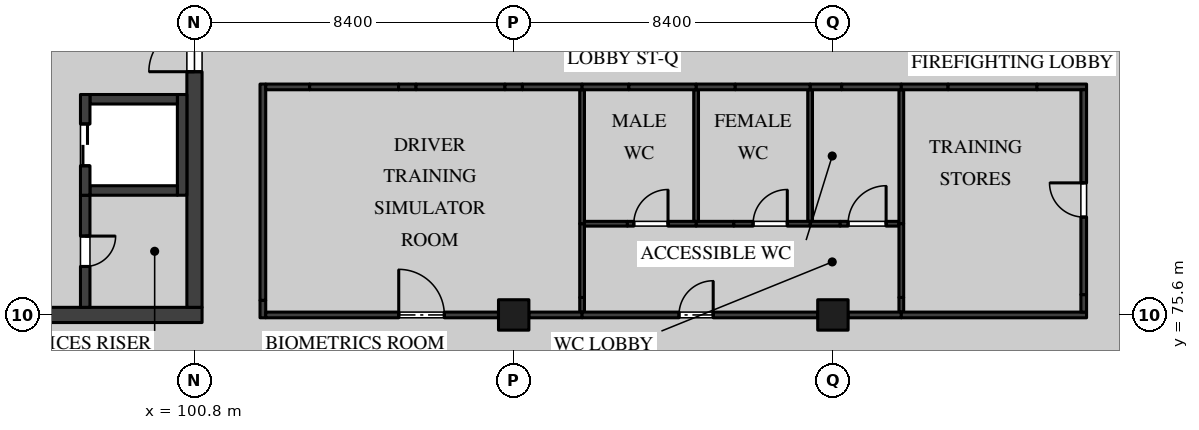
"""IFC4 building model, lengths in metres.
Left out: names, types, materials, properties, quantities, classifications, styles, units other than length and angle.
Written with IfcOpenShell. Run it as: python <this file> out.ifc"""

import sys

from ifc_helpers import new_model, si_unit, direction, frame, frame_2d, origin, origin_2d, place, context, subcontext, project, spatial, rectangle, extrude, element, fill, save


model = new_model("IFC4")
c1 = context("Model", 3, precision=1e-05, world=origin(), true_north=direction((0.0, 1.0)))
c2 = subcontext(c1, "Body", "Model", "MODEL_VIEW")
j1 = project(units=[si_unit("LENGTHUNIT", "METRE"), si_unit("PLANEANGLEUNIT", "RADIAN")], contexts=[c1])
p1 = place(None, origin())
s1 = spatial("IfcSite", under=j1, at=p1, CompositionType="ELEMENT")
p2 = place(p1, origin())
s2 = spatial("IfcBuilding", under=s1, at=p2, CompositionType="ELEMENT")
p3 = place(p2, frame((0.0, 0.0, 5.4)))
s3 = spatial("IfcBuildingStorey", under=s2, at=p3, CompositionType="ELEMENT", Elevation=5.4)
for number, where, z_axis, x_axis in (
    (1, (109.2, 75.6, 0.0), (0.0, 0.0, 1.0), (1.0, 0.0, 0.0)),
    (2, (117.6, 75.6, 0.0), (0.0, 0.0, 1.0), (1.0, 0.0, 0.0)),
):
    element("IfcColumn", number, at=place(p3, frame(where, z_axis=z_axis, x_axis=x_axis)), inside=s3, PredefinedType="COLUMN", context=c2, shape_type="SweptSolid", body=[
        extrude(rectangle(XDim=0.8, YDim=0.8, at=origin_2d()), origin(), (0.0, 0.0, 1.0), 4.37),
    ])
p4 = place(p3, frame((92.2, 75.6, 0.0), z_axis=(0.0, 0.0, 1.0), x_axis=(1.0, 0.0, 0.0)))
e3 = element("IfcWall", 3, at=p4, inside=s3, PredefinedType="SHEAR", context=c2, shape_type="SweptSolid", body=[
    extrude(rectangle(XDim=8.8, YDim=0.4, at=frame_2d((4.4, 0.0))), origin(), (0.0, 0.0, 1.0), 4.37),
])
p5 = place(p3, frame((100.8, 75.8, 0.0), z_axis=(0.0, 0.0, 1.0), x_axis=(0.0, 1.0, 0.0)))
e4 = element("IfcWall", 4, at=p5, inside=s3, PredefinedType="SHEAR", context=c2, shape_type="SweptSolid", body=[
    extrude(rectangle(XDim=8.0, YDim=0.4, at=frame_2d((4.0, 0.0))), origin(), (0.0, 0.0, 1.0), 4.37),
])
p6 = place(p5, frame((6.2, 0.0, 0.0)))
e5 = element("IfcOpeningElement", 5, at=p6, cuts=e4, PredefinedType="OPENING", context=c2, shape_type="SweptSolid", body=[
    extrude(rectangle(XDim=1.2, YDim=2.1, at=frame_2d((0.6, 1.05))), frame((0.0, 0.21, 0.0), z_axis=(0.0, -1.0, 0.0), x_axis=(1.0, 0.0, 0.0)), (0.0, 0.0, 1.0), 0.42),
])
p7 = place(p3, frame((97.925, 78.75, 0.0), z_axis=(0.0, 0.0, 1.0), x_axis=(0.0, -1.0, 0.0)))
e6 = element("IfcWall", 6, at=p7, inside=s3, PredefinedType="SOLIDWALL", context=c2, shape_type="SweptSolid", body=[
    extrude(rectangle(XDim=2.95, YDim=0.25, at=frame_2d((1.475, 0.0))), origin(), (0.0, 0.0, 1.0), 4.37),
])
p8 = place(p7, frame((1.075, 0.0, 0.0)))
e7 = element("IfcOpeningElement", 7, at=p8, cuts=e6, PredefinedType="OPENING", context=c2, shape_type="SweptSolid", body=[
    extrude(rectangle(XDim=0.8, YDim=2.1, at=frame_2d((0.4, 1.05))), frame((0.0, 0.135, 0.0), z_axis=(0.0, -1.0, 0.0), x_axis=(1.0, 0.0, 0.0)), (0.0, 0.0, 1.0), 0.27),
])
p9 = place(p3, frame((100.475, 78.75, 0.0), z_axis=(0.0, 0.0, 1.0), x_axis=(0.0, 1.0, 0.0)))
e8 = element("IfcWall", 8, at=p9, inside=s3, PredefinedType="SOLIDWALL", context=c2, shape_type="SweptSolid", body=[
    extrude(rectangle(XDim=2.65, YDim=0.25, at=frame_2d((1.325, 0.0))), origin(), (0.0, 0.0, 1.0), 4.37),
])
for number, where, z_axis, x_axis in (
    (9, (98.05, 81.275, 0.0), (0.0, 0.0, 1.0), (1.0, 0.0, 0.0)),
    (10, (98.05, 78.875, 0.0), (0.0, 0.0, 1.0), (1.0, 0.0, 0.0)),
):
    element("IfcWall", number, at=place(p3, frame(where, z_axis=z_axis, x_axis=x_axis)), inside=s3, PredefinedType="SOLIDWALL", context=c2, shape_type="SweptSolid", body=[
        extrude(rectangle(XDim=2.3, YDim=0.25, at=frame_2d((1.15, 0.0))), origin(), (0.0, 0.0, 1.0), 4.37),
    ])
p10 = place(p3, frame((97.925, 78.75, 0.0), z_axis=(0.0, 0.0, 1.0), x_axis=(0.0, 1.0, 0.0)))
e11 = element("IfcWall", 11, at=p10, inside=s3, PredefinedType="SOLIDWALL", context=c2, shape_type="SweptSolid", body=[
    extrude(rectangle(XDim=2.65, YDim=0.25, at=frame_2d((1.325, 0.0))), origin(), (0.0, 0.0, 1.0), 4.37),
])
p11 = place(p10, frame((0.775, 0.0, 0.0)))
e12 = element("IfcOpeningElement", 12, at=p11, cuts=e11, PredefinedType="OPENING", context=c2, shape_type="SweptSolid", body=[
    extrude(rectangle(XDim=1.1, YDim=2.1, at=frame_2d((0.55, 1.05))), frame((0.0, 0.135, 0.0), z_axis=(0.0, -1.0, 0.0), x_axis=(1.0, 0.0, 0.0)), (0.0, 0.0, 1.0), 0.27),
])
p12 = place(p3, frame((111.0, 75.675, 0.0), z_axis=(0.0, 0.0, 1.0), x_axis=(0.0, 1.0, 0.0)))
e13 = element("IfcWall", 13, at=p12, inside=s3, PredefinedType="PARTITIONING", context=c2, shape_type="SweptSolid", body=[
    extrude(rectangle(XDim=0.385, YDim=0.125, at=frame_2d((0.192, 0.0))), origin(), (0.0, 0.0, 1.0), 3.746),
])
p13 = place(p3, frame((111.0, 76.06, 0.0), z_axis=(0.0, 0.0, 1.0), x_axis=(0.0, 1.0, 0.0)))
e14 = element("IfcWall", 14, at=p13, inside=s3, PredefinedType="PARTITIONING", context=c2, shape_type="SweptSolid", body=[
    extrude(rectangle(XDim=1.94, YDim=0.125, at=frame_2d((0.97, 0.0))), origin(), (0.0, 0.0, 1.0), 4.37),
])
p14 = place(p3, frame((111.0, 78.0, 0.0), z_axis=(0.0, 0.0, 1.0), x_axis=(0.0, 1.0, 0.0)))
e15 = element("IfcWall", 15, at=p14, inside=s3, PredefinedType="PARTITIONING", context=c2, shape_type="SweptSolid", body=[
    extrude(rectangle(XDim=3.525, YDim=0.125, at=frame_2d((1.762, 0.0))), origin(), (0.0, 0.0, 1.0), 4.37),
])
p15 = place(p3, frame((102.6, 75.525, 0.0), z_axis=(0.0, 0.0, 1.0), x_axis=(0.0, 1.0, 0.0)))
e16 = element("IfcWall", 16, at=p15, inside=s3, PredefinedType="PARTITIONING", context=c2, shape_type="SweptSolid", body=[
    extrude(rectangle(XDim=0.46, YDim=0.15, at=frame_2d((0.23, 0.0))), origin(), (0.0, 0.0, 1.0), 3.746),
])
p16 = place(p3, frame((102.6, 75.985, 0.0), z_axis=(0.0, 0.0, 1.0), x_axis=(0.0, 1.0, 0.0)))
e17 = element("IfcWall", 17, at=p16, inside=s3, PredefinedType="PARTITIONING", context=c2, shape_type="SweptSolid", body=[
    extrude(rectangle(XDim=5.69, YDim=0.15, at=frame_2d((2.845, 0.0))), origin(), (0.0, 0.0, 1.0), 4.37),
])
p17 = place(p3, frame((102.675, 75.6, 0.0), z_axis=(0.0, 0.0, 1.0), x_axis=(1.0, 0.0, 0.0)))
e18 = element("IfcWall", 18, at=p17, inside=s3, PredefinedType="PARTITIONING", context=c2, shape_type="SweptSolid", body=[
    extrude(rectangle(XDim=6.125, YDim=0.15, at=frame_2d((3.062, 0.0))), origin(), (0.0, 0.0, 1.0), 3.746),
])
p18 = place(p17, frame((3.5, 0.0, 0.0)))
e19 = element("IfcOpeningElement", 19, at=p18, cuts=e18, PredefinedType="OPENING", context=c2, shape_type="SweptSolid", body=[
    extrude(rectangle(XDim=1.2, YDim=2.4, at=frame_2d((0.6, 1.2))), frame((0.0, 0.085, 0.0), z_axis=(0.0, -1.0, 0.0), x_axis=(1.0, 0.0, 0.0)), (0.0, 0.0, 1.0), 0.17),
])
p19 = place(p3, frame((109.6, 75.6, 0.0), z_axis=(0.0, 0.0, 1.0), x_axis=(1.0, 0.0, 0.0)))
e20 = element("IfcWall", 20, at=p19, inside=s3, PredefinedType="PARTITIONING", context=c2, shape_type="SweptSolid", body=[
    extrude(rectangle(XDim=1.4, YDim=0.15, at=frame_2d((0.7, 0.0))), origin(), (0.0, 0.0, 1.0), 3.746),
])
p20 = place(p3, frame((102.675, 81.6, 0.0), z_axis=(0.0, 0.0, 1.0), x_axis=(1.0, 0.0, 0.0)))
e21 = element("IfcWall", 21, at=p20, inside=s3, PredefinedType="PARTITIONING", context=c2, shape_type="SweptSolid", body=[
    extrude(rectangle(XDim=1.155, YDim=0.15, at=frame_2d((0.578, 0.0))), origin(), (0.0, 0.0, 1.0), 3.895),
])
p21 = place(p3, frame((103.83, 81.6, 0.0), z_axis=(0.0, 0.0, 1.0), x_axis=(1.0, 0.0, 0.0)))
e22 = element("IfcWall", 22, at=p21, inside=s3, PredefinedType="PARTITIONING", context=c2, shape_type="SweptSolid", body=[
    extrude(rectangle(XDim=2.34, YDim=0.15, at=frame_2d((1.17, 0.0))), origin(), (0.0, 0.0, 1.0), 4.37),
])
p22 = place(p3, frame((106.17, 81.6, 0.0), z_axis=(0.0, 0.0, 1.0), x_axis=(1.0, 0.0, 0.0)))
e23 = element("IfcWall", 23, at=p22, inside=s3, PredefinedType="PARTITIONING", context=c2, shape_type="SweptSolid", body=[
    extrude(rectangle(XDim=0.46, YDim=0.15, at=frame_2d((0.23, 0.0))), origin(), (0.0, 0.0, 1.0), 3.895),
])
p23 = place(p3, frame((106.63, 81.6, 0.0), z_axis=(0.0, 0.0, 1.0), x_axis=(1.0, 0.0, 0.0)))
e24 = element("IfcWall", 24, at=p23, inside=s3, PredefinedType="PARTITIONING", context=c2, shape_type="SweptSolid", body=[
    extrude(rectangle(XDim=2.34, YDim=0.15, at=frame_2d((1.17, 0.0))), origin(), (0.0, 0.0, 1.0), 4.37),
])
p24 = place(p3, frame((108.97, 81.6, 0.0), z_axis=(0.0, 0.0, 1.0), x_axis=(1.0, 0.0, 0.0)))
e25 = element("IfcWall", 25, at=p24, inside=s3, PredefinedType="PARTITIONING", context=c2, shape_type="SweptSolid", body=[
    extrude(rectangle(XDim=0.46, YDim=0.15, at=frame_2d((0.23, 0.0))), origin(), (0.0, 0.0, 1.0), 3.746),
])
p25 = place(p3, frame((109.43, 81.6, 0.0), z_axis=(0.0, 0.0, 1.0), x_axis=(1.0, 0.0, 0.0)))
e26 = element("IfcWall", 26, at=p25, inside=s3, PredefinedType="PARTITIONING", context=c2, shape_type="SweptSolid", body=[
    extrude(rectangle(XDim=1.57, YDim=0.15, at=frame_2d((0.785, 0.0))), origin(), (0.0, 0.0, 1.0), 4.37),
])
p26 = place(p3, frame((117.0, 78.062, 0.0), z_axis=(0.0, 0.0, 1.0), x_axis=(0.0, 1.0, 0.0)))
e27 = element("IfcWall", 27, at=p26, inside=s3, PredefinedType="PARTITIONING", context=c2, shape_type="SweptSolid", body=[
    extrude(rectangle(XDim=3.463, YDim=0.125, at=frame_2d((1.731, 0.0))), origin(), (0.0, 0.0, 1.0), 4.37),
])
p27 = place(p3, frame((117.0, 78.0, 0.0), z_axis=(0.0, 0.0, 1.0), x_axis=(1.0, 0.0, 0.0)))
e28 = element("IfcWall", 28, at=p27, inside=s3, PredefinedType="PARTITIONING", context=c2, shape_type="SweptSolid", body=[
    extrude(rectangle(XDim=0.792, YDim=0.125, at=frame_2d((0.396, 0.0))), origin(), (0.0, 0.0, 1.0), 3.746),
])
p28 = place(p3, frame((117.792, 78.0, 0.0), z_axis=(0.0, 0.0, 1.0), x_axis=(1.0, 0.0, 0.0)))
e29 = element("IfcWall", 29, at=p28, inside=s3, PredefinedType="PARTITIONING", context=c2, shape_type="SweptSolid", body=[
    extrude(rectangle(XDim=1.546, YDim=0.125, at=frame_2d((0.773, 0.0))), origin(), (0.0, 0.0, 1.0), 4.37),
])
p29 = place(p28, frame((0.208, 0.0, 0.0)))
e30 = element("IfcOpeningElement", 30, at=p29, cuts=e29, PredefinedType="OPENING", context=c2, shape_type="SweptSolid", body=[
    extrude(rectangle(XDim=1.0, YDim=2.1, at=frame_2d((0.5, 1.05))), frame((0.0, 0.073, 0.0), z_axis=(0.0, -1.0, 0.0), x_axis=(1.0, 0.0, 0.0)), (0.0, 0.0, 1.0), 0.145),
])
p30 = place(p3, frame((119.4, 78.0, 0.0), z_axis=(0.0, 0.0, 1.0), x_axis=(0.0, 1.0, 0.0)))
e31 = element("IfcWall", 31, at=p30, inside=s3, PredefinedType="PARTITIONING", context=c2, shape_type="SweptSolid", body=[
    extrude(rectangle(XDim=3.525, YDim=0.125, at=frame_2d((1.762, 0.0))), origin(), (0.0, 0.0, 1.0), 4.37),
])
p31 = place(p3, frame((117.0, 81.6, 0.0), z_axis=(0.0, 0.0, 1.0), x_axis=(1.0, 0.0, 0.0)))
e32 = element("IfcWall", 32, at=p31, inside=s3, PredefinedType="PARTITIONING", context=c2, shape_type="SweptSolid", body=[
    extrude(rectangle(XDim=0.83, YDim=0.15, at=frame_2d((0.415, 0.0))), origin(), (0.0, 0.0, 1.0), 3.746),
])
p32 = place(p3, frame((117.83, 81.6, 0.0), z_axis=(0.0, 0.0, 1.0), x_axis=(1.0, 0.0, 0.0)))
e33 = element("IfcWall", 33, at=p32, inside=s3, PredefinedType="PARTITIONING", context=c2, shape_type="SweptSolid", body=[
    extrude(rectangle(XDim=1.57, YDim=0.15, at=frame_2d((0.785, 0.0))), origin(), (0.0, 0.0, 1.0), 4.37),
])
p33 = place(p3, frame((114.0, 78.0, 0.0), z_axis=(0.0, 0.0, 1.0), x_axis=(1.0, 0.0, 0.0)))
e34 = element("IfcWall", 34, at=p33, inside=s3, PredefinedType="PARTITIONING", context=c2, shape_type="SweptSolid", body=[
    extrude(rectangle(XDim=0.992, YDim=0.125, at=frame_2d((0.496, 0.0))), origin(), (0.0, 0.0, 1.0), 3.895),
])
p34 = place(p3, frame((114.992, 78.0, 0.0), z_axis=(0.0, 0.0, 1.0), x_axis=(1.0, 0.0, 0.0)))
e35 = element("IfcWall", 35, at=p34, inside=s3, PredefinedType="PARTITIONING", context=c2, shape_type="SweptSolid", body=[
    extrude(rectangle(XDim=2.008, YDim=0.125, at=frame_2d((1.004, 0.0))), origin(), (0.0, 0.0, 1.0), 4.37),
])
p35 = place(p34, frame((0.508, 0.0, 0.0)))
e36 = element("IfcOpeningElement", 36, at=p35, cuts=e35, PredefinedType="OPENING", context=c2, shape_type="SweptSolid", body=[
    extrude(rectangle(XDim=0.9, YDim=2.1, at=frame_2d((0.45, 1.05))), frame((0.0, 0.073, 0.0), z_axis=(0.0, -1.0, 0.0), x_axis=(1.0, 0.0, 0.0)), (0.0, 0.0, 1.0), 0.145),
])
p36 = place(p3, frame((114.0, 78.062, 0.0), z_axis=(0.0, 0.0, 1.0), x_axis=(0.0, 1.0, 0.0)))
e37 = element("IfcWall", 37, at=p36, inside=s3, PredefinedType="PARTITIONING", context=c2, shape_type="SweptSolid", body=[
    extrude(rectangle(XDim=3.463, YDim=0.125, at=frame_2d((1.731, 0.0))), origin(), (0.0, 0.0, 1.0), 4.37),
])
p37 = place(p3, frame((114.0, 81.6, 0.0), z_axis=(0.0, 0.0, 1.0), x_axis=(1.0, 0.0, 0.0)))
e38 = element("IfcWall", 38, at=p37, inside=s3, PredefinedType="PARTITIONING", context=c2, shape_type="SweptSolid", body=[
    extrude(rectangle(XDim=1.03, YDim=0.15, at=frame_2d((0.515, 0.0))), origin(), (0.0, 0.0, 1.0), 3.895),
])
p38 = place(p3, frame((115.03, 81.6, 0.0), z_axis=(0.0, 0.0, 1.0), x_axis=(1.0, 0.0, 0.0)))
e39 = element("IfcWall", 39, at=p38, inside=s3, PredefinedType="PARTITIONING", context=c2, shape_type="SweptSolid", body=[
    extrude(rectangle(XDim=1.97, YDim=0.15, at=frame_2d((0.985, 0.0))), origin(), (0.0, 0.0, 1.0), 4.37),
])
p39 = place(p3, frame((111.062, 78.0, 0.0), z_axis=(0.0, 0.0, 1.0), x_axis=(1.0, 0.0, 0.0)))
e40 = element("IfcWall", 40, at=p39, inside=s3, PredefinedType="PARTITIONING", context=c2, shape_type="SweptSolid", body=[
    extrude(rectangle(XDim=1.13, YDim=0.125, at=frame_2d((0.565, 0.0))), origin(), (0.0, 0.0, 1.0), 3.895),
])
p40 = place(p3, frame((112.192, 78.0, 0.0), z_axis=(0.0, 0.0, 1.0), x_axis=(1.0, 0.0, 0.0)))
e41 = element("IfcWall", 41, at=p40, inside=s3, PredefinedType="PARTITIONING", context=c2, shape_type="SweptSolid", body=[
    extrude(rectangle(XDim=1.808, YDim=0.125, at=frame_2d((0.904, 0.0))), origin(), (0.0, 0.0, 1.0), 4.37),
])
p41 = place(p40, frame((0.169, 0.0, 0.0)))
e42 = element("IfcOpeningElement", 42, at=p41, cuts=e41, PredefinedType="OPENING", context=c2, shape_type="SweptSolid", body=[
    extrude(rectangle(XDim=0.9, YDim=2.1, at=frame_2d((0.45, 1.05))), frame((0.0, 0.073, 0.0), z_axis=(0.0, -1.0, 0.0), x_axis=(1.0, 0.0, 0.0)), (0.0, 0.0, 1.0), 0.145),
])
p42 = place(p3, frame((119.4, 75.675, 0.0), z_axis=(0.0, 0.0, 1.0), x_axis=(0.0, 1.0, 0.0)))
e43 = element("IfcWall", 43, at=p42, inside=s3, PredefinedType="PARTITIONING", context=c2, shape_type="SweptSolid", body=[
    extrude(rectangle(XDim=0.385, YDim=0.125, at=frame_2d((0.192, 0.0))), origin(), (0.0, 0.0, 1.0), 3.746),
])
p43 = place(p3, frame((119.4, 76.06, 0.0), z_axis=(0.0, 0.0, 1.0), x_axis=(0.0, 1.0, 0.0)))
e44 = element("IfcWall", 44, at=p43, inside=s3, PredefinedType="PARTITIONING", context=c2, shape_type="SweptSolid", body=[
    extrude(rectangle(XDim=1.94, YDim=0.125, at=frame_2d((0.97, 0.0))), origin(), (0.0, 0.0, 1.0), 4.37),
])
p44 = place(p3, frame((111.0, 75.6, 0.0), z_axis=(0.0, 0.0, 1.0), x_axis=(1.0, 0.0, 0.0)))
e45 = element("IfcWall", 45, at=p44, inside=s3, PredefinedType="PARTITIONING", context=c2, shape_type="SweptSolid", body=[
    extrude(rectangle(XDim=6.2, YDim=0.15, at=frame_2d((3.1, 0.0))), origin(), (0.0, 0.0, 1.0), 3.746),
])
p45 = place(p44, frame((2.55, 0.0, 0.0)))
e46 = element("IfcOpeningElement", 46, at=p45, cuts=e45, PredefinedType="OPENING", context=c2, shape_type="SweptSolid", body=[
    extrude(rectangle(XDim=0.9, YDim=2.1, at=frame_2d((0.45, 1.05))), frame((0.0, 0.085, 0.0), z_axis=(0.0, -1.0, 0.0), x_axis=(1.0, 0.0, 0.0)), (0.0, 0.0, 1.0), 0.17),
])
p46 = place(p3, frame((118.0, 75.6, 0.0), z_axis=(0.0, 0.0, 1.0), x_axis=(1.0, 0.0, 0.0)))
e47 = element("IfcWall", 47, at=p46, inside=s3, PredefinedType="PARTITIONING", context=c2, shape_type="SweptSolid", body=[
    extrude(rectangle(XDim=1.4, YDim=0.15, at=frame_2d((0.7, 0.0))), origin(), (0.0, 0.0, 1.0), 3.746),
])
p47 = place(p3, frame((111.0, 81.6, 0.0), z_axis=(0.0, 0.0, 1.0), x_axis=(1.0, 0.0, 0.0)))
e48 = element("IfcWall", 48, at=p47, inside=s3, PredefinedType="PARTITIONING", context=c2, shape_type="SweptSolid", body=[
    extrude(rectangle(XDim=1.23, YDim=0.15, at=frame_2d((0.615, 0.0))), origin(), (0.0, 0.0, 1.0), 3.895),
])
p48 = place(p3, frame((112.23, 81.6, 0.0), z_axis=(0.0, 0.0, 1.0), x_axis=(1.0, 0.0, 0.0)))
e49 = element("IfcWall", 49, at=p48, inside=s3, PredefinedType="PARTITIONING", context=c2, shape_type="SweptSolid", body=[
    extrude(rectangle(XDim=1.77, YDim=0.15, at=frame_2d((0.885, 0.0))), origin(), (0.0, 0.0, 1.0), 4.37),
])
p49 = place(p3, frame((119.4, 75.6, 0.0), z_axis=(0.0, 0.0, 1.0), x_axis=(1.0, 0.0, 0.0)))
e50 = element("IfcWall", 50, at=p49, inside=s3, PredefinedType="PARTITIONING", context=c2, shape_type="SweptSolid", body=[
    extrude(rectangle(XDim=4.875, YDim=0.15, at=frame_2d((2.438, 0.0))), origin(), (0.0, 0.0, 1.0), 3.746),
])
p50 = place(p3, frame((119.4, 81.6, 0.0), z_axis=(0.0, 0.0, 1.0), x_axis=(1.0, 0.0, 0.0)))
e51 = element("IfcWall", 51, at=p50, inside=s3, PredefinedType="PARTITIONING", context=c2, shape_type="SweptSolid", body=[
    extrude(rectangle(XDim=1.23, YDim=0.15, at=frame_2d((0.615, 0.0))), origin(), (0.0, 0.0, 1.0), 3.895),
])
p51 = place(p3, frame((120.63, 81.6, 0.0), z_axis=(0.0, 0.0, 1.0), x_axis=(1.0, 0.0, 0.0)))
e52 = element("IfcWall", 52, at=p51, inside=s3, PredefinedType="PARTITIONING", context=c2, shape_type="SweptSolid", body=[
    extrude(rectangle(XDim=2.34, YDim=0.15, at=frame_2d((1.17, 0.0))), origin(), (0.0, 0.0, 1.0), 4.37),
])
p52 = place(p3, frame((122.97, 81.6, 0.0), z_axis=(0.0, 0.0, 1.0), x_axis=(1.0, 0.0, 0.0)))
e53 = element("IfcWall", 53, at=p52, inside=s3, PredefinedType="PARTITIONING", context=c2, shape_type="SweptSolid", body=[
    extrude(rectangle(XDim=1.305, YDim=0.15, at=frame_2d((0.652, 0.0))), origin(), (0.0, 0.0, 1.0), 3.895),
])
p53 = place(p3, frame((124.2, 75.675, 0.0), z_axis=(0.0, 0.0, 1.0), x_axis=(0.0, 1.0, 0.0)))
e54 = element("IfcWall", 54, at=p53, inside=s3, PredefinedType="PARTITIONING", context=c2, shape_type="SweptSolid", body=[
    extrude(rectangle(XDim=0.46, YDim=0.15, at=frame_2d((0.23, 0.0))), origin(), (0.0, 0.0, 1.0), 3.746),
])
p54 = place(p3, frame((124.2, 76.135, 0.0), z_axis=(0.0, 0.0, 1.0), x_axis=(0.0, 1.0, 0.0)))
e55 = element("IfcWall", 55, at=p54, inside=s3, PredefinedType="PARTITIONING", context=c2, shape_type="SweptSolid", body=[
    extrude(rectangle(XDim=5.39, YDim=0.15, at=frame_2d((2.695, 0.0))), origin(), (0.0, 0.0, 1.0), 4.37),
])
p55 = place(p54, frame((2.04, 0.0, 0.0)))
e56 = element("IfcOpeningElement", 56, at=p55, cuts=e55, PredefinedType="OPENING", context=c2, shape_type="SweptSolid", body=[
    extrude(rectangle(XDim=0.9, YDim=2.1, at=frame_2d((0.45, 1.05))), frame((0.0, 0.085, 0.0), z_axis=(0.0, -1.0, 0.0), x_axis=(1.0, 0.0, 0.0)), (0.0, 0.0, 1.0), 0.17),
])
p56 = place(p6, origin())
e57 = element("IfcDoor", 57, at=p56, inside=s3, OperationType="SINGLE_SWING_RIGHT", PredefinedType="DOOR", context=c2, shape_type="SweptSolid", body=[
    extrude(rectangle(XDim=1.2, YDim=2.1, at=frame_2d((0.6, 1.05))), frame((0.0, 0.035, 0.0), z_axis=(0.0, -1.0, 0.0), x_axis=(1.0, 0.0, 0.0)), (0.0, 0.0, 1.0), 0.07),
])
fill(e5, e57)
p57 = place(p8, origin())
e58 = element("IfcDoor", 58, at=p57, inside=s3, OperationType="SINGLE_SWING_RIGHT", PredefinedType="DOOR", context=c2, shape_type="SweptSolid", body=[
    extrude(rectangle(XDim=0.8, YDim=2.1, at=frame_2d((0.4, 1.05))), frame((0.0, 0.035, 0.0), z_axis=(0.0, -1.0, 0.0), x_axis=(1.0, 0.0, 0.0)), (0.0, 0.0, 1.0), 0.07),
])
fill(e7, e58)
p58 = place(p11, origin())
e59 = element("IfcDoor", 59, at=p58, inside=s3, OperationType="DOUBLE_DOOR_SLIDING", PredefinedType="DOOR", context=c2, shape_type="SweptSolid", body=[
    extrude(rectangle(XDim=1.1, YDim=2.1, at=frame_2d((0.55, 1.05))), frame((0.0, 0.04, 0.0), z_axis=(0.0, -1.0, 0.0), x_axis=(1.0, 0.0, 0.0)), (0.0, 0.0, 1.0), 0.08),
])
fill(e12, e59)
p59 = place(p18, origin())
e60 = element("IfcDoor", 60, at=p59, inside=s3, OperationType="SINGLE_SWING_RIGHT", PredefinedType="DOOR", context=c2, shape_type="SweptSolid", body=[
    extrude(rectangle(XDim=1.2, YDim=2.4, at=frame_2d((0.6, 1.2))), frame((0.0, 0.025, 0.0), z_axis=(0.0, -1.0, 0.0), x_axis=(1.0, 0.0, 0.0)), (0.0, 0.0, 1.0), 0.05),
])
fill(e19, e60)
p60 = place(p29, origin())
e61 = element("IfcDoor", 61, at=p60, inside=s3, OperationType="SINGLE_SWING_LEFT", PredefinedType="DOOR", context=c2, shape_type="SweptSolid", body=[
    extrude(rectangle(XDim=1.0, YDim=2.1, at=frame_2d((0.5, 1.05))), frame((0.0, 0.02, 0.0), z_axis=(0.0, -1.0, 0.0), x_axis=(1.0, 0.0, 0.0)), (0.0, 0.0, 1.0), 0.04),
])
fill(e30, e61)
p61 = place(p35, origin())
e62 = element("IfcDoor", 62, at=p61, inside=s3, OperationType="SINGLE_SWING_LEFT", PredefinedType="DOOR", context=c2, shape_type="SweptSolid", body=[
    extrude(rectangle(XDim=0.9, YDim=2.1, at=frame_2d((0.45, 1.05))), frame((0.0, 0.02, 0.0), z_axis=(0.0, -1.0, 0.0), x_axis=(1.0, 0.0, 0.0)), (0.0, 0.0, 1.0), 0.04),
])
fill(e36, e62)
p62 = place(p45, origin())
e63 = element("IfcDoor", 63, at=p62, inside=s3, OperationType="SINGLE_SWING_LEFT", PredefinedType="DOOR", context=c2, shape_type="SweptSolid", body=[
    extrude(rectangle(XDim=0.9, YDim=2.1, at=frame_2d((0.45, 1.05))), frame((0.0, 0.025, 0.0), z_axis=(0.0, -1.0, 0.0), x_axis=(1.0, 0.0, 0.0)), (0.0, 0.0, 1.0), 0.05),
])
fill(e46, e63)
p63 = place(p41, origin())
e64 = element("IfcDoor", 64, at=p63, inside=s3, OperationType="SINGLE_SWING_LEFT", PredefinedType="DOOR", context=c2, shape_type="SweptSolid", body=[
    extrude(rectangle(XDim=0.9, YDim=2.1, at=frame_2d((0.45, 1.05))), frame((0.0, 0.02, 0.0), z_axis=(0.0, -1.0, 0.0), x_axis=(1.0, 0.0, 0.0)), (0.0, 0.0, 1.0), 0.04),
])
fill(e42, e64)
p64 = place(p55, origin())
e65 = element("IfcDoor", 65, at=p64, inside=s3, OperationType="SINGLE_SWING_LEFT", PredefinedType="DOOR", context=c2, shape_type="SweptSolid", body=[
    extrude(rectangle(XDim=0.9, YDim=2.1, at=frame_2d((0.45, 1.05))), frame((0.0, 0.025, 0.0), z_axis=(0.0, -1.0, 0.0), x_axis=(1.0, 0.0, 0.0)), (0.0, 0.0, 1.0), 0.05),
])
fill(e56, e65)
save(model, sys.argv[1])
